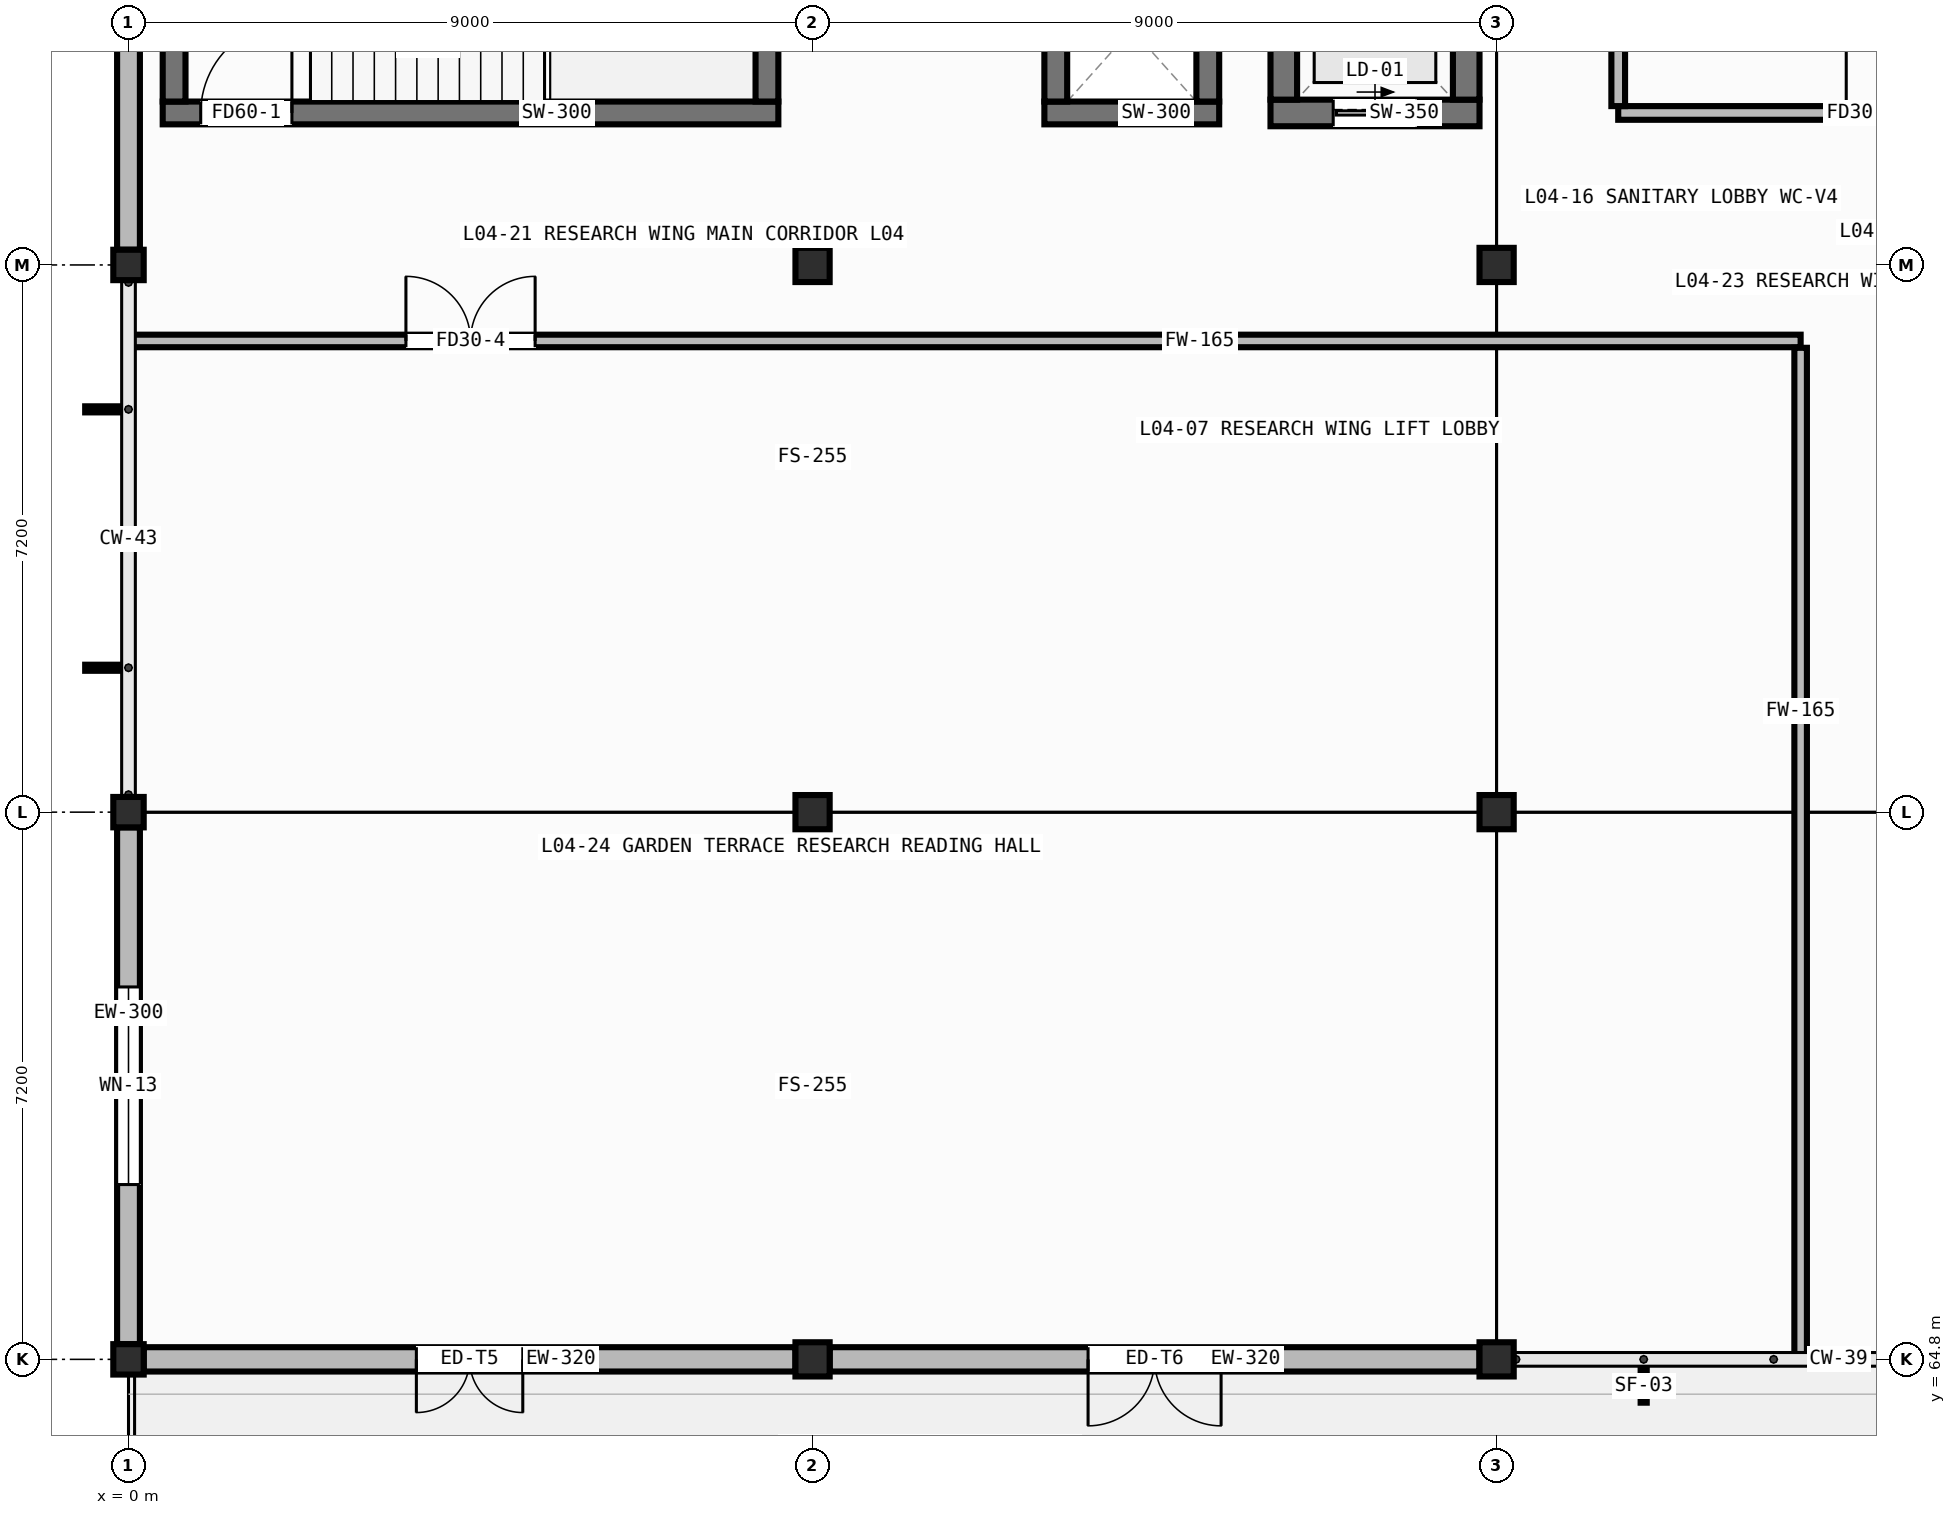
"""IFC4 building model, lengths in metres.
Left out: names, types, materials, properties, quantities, classifications, styles, units other than length and angle.
Written with IfcOpenShell. Run it as: python <this file> out.ifc"""

import sys

from ifc_helpers import new_model, si_unit, direction, frame, frame_2d, origin, origin_2d, place, context, subcontext, project, spatial, rectangle, hollow_rectangle, extrude, element, fill, save


model = new_model("IFC4")
c1 = context("Model", 3, precision=1e-05, world=origin(), true_north=direction((0.0, 1.0)))
c2 = subcontext(c1, "Body", "Model", "MODEL_VIEW")
j1 = project(units=[si_unit("LENGTHUNIT", "METRE"), si_unit("PLANEANGLEUNIT", "RADIAN")], contexts=[c1])
p1 = place(None, origin())
s1 = spatial("IfcSite", under=j1, at=p1, CompositionType="ELEMENT")
p2 = place(p1, origin())
s2 = spatial("IfcBuilding", under=s1, at=p2, CompositionType="ELEMENT")
p3 = place(p2, frame((0.0, 0.0, 12.8)))
s3 = spatial("IfcBuildingStorey", under=s2, at=p3, CompositionType="ELEMENT", Elevation=12.8)
for number, where, z_axis, x_axis in (
    (1, (0.0, 64.8, 0.0), (0.0, 0.0, 1.0), (1.0, 0.0, 0.0)),
    (2, (0.0, 72.0, 0.0), (0.0, 0.0, 1.0), (1.0, 0.0, 0.0)),
    (3, (0.0, 79.2, 0.0), (0.0, 0.0, 1.0), (1.0, 0.0, 0.0)),
):
    element("IfcColumn", number, at=place(p3, frame(where, z_axis=z_axis, x_axis=x_axis)), inside=s3, PredefinedType="COLUMN", context=c2, shape_type="SweptSolid", body=[
        extrude(hollow_rectangle(XDim=0.4, YDim=0.4, WallThickness=0.016, at=origin_2d()), origin(), (0.0, 0.0, 1.0), 4.2),
    ])
for number, where, z_axis, x_axis in (
    (4, (9.0, 64.8, 0.0), (0.0, 0.0, 1.0), (1.0, 0.0, 0.0)),
    (5, (9.0, 72.0, 0.0), (0.0, 0.0, 1.0), (1.0, 0.0, 0.0)),
    (6, (9.0, 79.2, 0.0), (0.0, 0.0, 1.0), (1.0, 0.0, 0.0)),
    (7, (18.0, 64.8, 0.0), (0.0, 0.0, 1.0), (1.0, 0.0, 0.0)),
    (8, (18.0, 72.0, 0.0), (0.0, 0.0, 1.0), (1.0, 0.0, 0.0)),
    (9, (18.0, 79.2, 0.0), (0.0, 0.0, 1.0), (1.0, 0.0, 0.0)),
):
    element("IfcColumn", number, at=place(p3, frame(where, z_axis=z_axis, x_axis=x_axis)), inside=s3, PredefinedType="COLUMN", context=c2, shape_type="SweptSolid", body=[
        extrude(hollow_rectangle(XDim=0.45, YDim=0.45, WallThickness=0.019, at=origin_2d()), origin(), (0.0, 0.0, 1.0), 4.2),
    ])
p4 = place(p3, frame((0.2, 64.8, 0.0), z_axis=(0.0, 0.0, 1.0), x_axis=(1.0, 0.0, 0.0)))
e10 = element("IfcWall", 10, at=p4, inside=s3, PredefinedType="STANDARD", context=c2, shape_type="SweptSolid", body=[
    extrude(rectangle(XDim=8.575, YDim=0.32, at=frame_2d((4.288, 0.0))), origin(), (0.0, 0.0, 1.0), 3.49),
])
p5 = place(p4, frame((3.587, 0.0, 0.0)))
e11 = element("IfcOpeningElement", 11, at=p5, cuts=e10, PredefinedType="OPENING", context=c2, shape_type="SweptSolid", body=[
    extrude(rectangle(XDim=1.4, YDim=2.02, at=frame_2d((0.7, 1.01))), frame((0.0, 0.172, 0.0), z_axis=(0.0, -1.0, 0.0), x_axis=(1.0, 0.0, 0.0)), (0.0, 0.0, 1.0), 0.344),
])
p6 = place(p3, frame((9.225, 64.8, 0.0), z_axis=(0.0, 0.0, 1.0), x_axis=(1.0, 0.0, 0.0)))
e12 = element("IfcWall", 12, at=p6, inside=s3, PredefinedType="STANDARD", context=c2, shape_type="SweptSolid", body=[
    extrude(rectangle(XDim=8.55, YDim=0.32, at=frame_2d((4.275, 0.0))), origin(), (0.0, 0.0, 1.0), 3.49),
])
p7 = place(p6, frame((3.4, 0.0, 0.0)))
e13 = element("IfcOpeningElement", 13, at=p7, cuts=e12, PredefinedType="OPENING", context=c2, shape_type="SweptSolid", body=[
    extrude(rectangle(XDim=1.75, YDim=2.12, at=frame_2d((0.875, 1.06))), frame((0.0, 0.172, 0.0), z_axis=(0.0, -1.0, 0.0), x_axis=(1.0, 0.0, 0.0)), (0.0, 0.0, 1.0), 0.344),
])
p8 = place(p3, frame((0.0, 65.0, 0.0), z_axis=(0.0, 0.0, 1.0), x_axis=(0.0, 1.0, 0.0)))
e14 = element("IfcWall", 14, at=p8, inside=s3, PredefinedType="STANDARD", context=c2, shape_type="SweptSolid", body=[
    extrude(rectangle(XDim=6.8, YDim=0.3, at=frame_2d((3.4, 0.0))), origin(), (0.0, 0.0, 1.0), 3.49),
])
p9 = place(p8, frame((2.1, 0.0, 0.85)))
e15 = element("IfcOpeningElement", 15, at=p9, cuts=e14, PredefinedType="OPENING", context=c2, shape_type="SweptSolid", body=[
    extrude(rectangle(XDim=2.6, YDim=1.6, at=frame_2d((1.3, 0.8))), frame((0.0, 0.162, 0.0), z_axis=(0.0, -1.0, 0.0), x_axis=(1.0, 0.0, 0.0)), (0.0, 0.0, 1.0), 0.324),
])
p10 = place(p3, frame((0.0, 79.4, 0.0), z_axis=(0.0, 0.0, 1.0), x_axis=(0.0, 1.0, 0.0)))
e16 = element("IfcWall", 16, at=p10, inside=s3, PredefinedType="STANDARD", context=c2, shape_type="SweptSolid", body=[
    extrude(rectangle(XDim=6.8, YDim=0.3, at=frame_2d((3.4, 0.0))), origin(), (0.0, 0.0, 1.0), 3.49),
])
p11 = place(p3, frame((0.45, 81.2, 0.0), z_axis=(0.0, 0.0, 1.0), x_axis=(1.0, 0.0, 0.0)))
e17 = element("IfcWall", 17, at=p11, inside=s3, PredefinedType="SHEAR", context=c2, shape_type="SweptSolid", body=[
    extrude(rectangle(XDim=8.1, YDim=0.3, at=frame_2d((4.05, 0.0))), origin(), (0.0, 0.0, 1.0), 3.94),
])
p12 = place(p11, frame((0.5, 0.0, 0.0)))
e18 = element("IfcOpeningElement", 18, at=p12, cuts=e17, PredefinedType="OPENING", context=c2, shape_type="SweptSolid", body=[
    extrude(rectangle(XDim=1.2, YDim=2.1, at=frame_2d((0.6, 1.05))), frame((0.0, 0.162, 0.0), z_axis=(0.0, -1.0, 0.0), x_axis=(1.0, 0.0, 0.0)), (0.0, 0.0, 1.0), 0.324),
])
for number, where, z_axis, x_axis in (
    (19, (0.6, 81.35, 0.0), (0.0, 0.0, 1.0), (0.0, 1.0, 0.0)),
    (20, (8.4, 81.35, 0.0), (0.0, 0.0, 1.0), (0.0, 1.0, 0.0)),
):
    element("IfcWall", number, at=place(p3, frame(where, z_axis=z_axis, x_axis=x_axis)), inside=s3, PredefinedType="SHEAR", context=c2, shape_type="SweptSolid", body=[
        extrude(rectangle(XDim=3.8, YDim=0.3, at=frame_2d((1.9, 0.0))), origin(), (0.0, 0.0, 1.0), 3.94),
    ])
p13 = place(p3, frame((15.025, 81.2, 0.0), z_axis=(0.0, 0.0, 1.0), x_axis=(1.0, 0.0, 0.0)))
e21 = element("IfcWall", 21, at=p13, inside=s3, PredefinedType="SHEAR", context=c2, shape_type="SweptSolid", body=[
    extrude(rectangle(XDim=2.75, YDim=0.35, at=frame_2d((1.375, 0.0))), origin(), (0.0, 0.0, 1.0), 3.94),
])
p14 = place(p13, frame((0.825, 0.0, 0.0)))
e22 = element("IfcOpeningElement", 22, at=p14, cuts=e21, PredefinedType="OPENING", context=c2, shape_type="SweptSolid", body=[
    extrude(rectangle(XDim=1.1, YDim=2.1, at=frame_2d((0.55, 1.05))), frame((0.0, 0.187, 0.0), z_axis=(0.0, -1.0, 0.0), x_axis=(1.0, 0.0, 0.0)), (0.0, 0.0, 1.0), 0.374),
])
for number, where, z_axis, x_axis in (
    (23, (15.2, 81.375, 0.0), (0.0, 0.0, 1.0), (0.0, 1.0, 0.0)),
    (24, (17.6, 81.375, 0.0), (0.0, 0.0, 1.0), (0.0, 1.0, 0.0)),
):
    element("IfcWall", number, at=place(p3, frame(where, z_axis=z_axis, x_axis=x_axis)), inside=s3, PredefinedType="SHEAR", context=c2, shape_type="SweptSolid", body=[
        extrude(rectangle(XDim=2.25, YDim=0.35, at=frame_2d((1.125, 0.0))), origin(), (0.0, 0.0, 1.0), 3.94),
    ])
p15 = place(p3, frame((12.05, 81.2, 0.0), z_axis=(0.0, 0.0, 1.0), x_axis=(1.0, 0.0, 0.0)))
e25 = element("IfcWall", 25, at=p15, inside=s3, PredefinedType="SHEAR", context=c2, shape_type="SweptSolid", body=[
    extrude(rectangle(XDim=2.3, YDim=0.3, at=frame_2d((1.15, 0.0))), origin(), (0.0, 0.0, 1.0), 3.94),
])
for number, where, z_axis, x_axis in (
    (26, (12.2, 81.35, 0.0), (0.0, 0.0, 1.0), (0.0, 1.0, 0.0)),
    (27, (14.2, 81.35, 0.0), (0.0, 0.0, 1.0), (0.0, 1.0, 0.0)),
):
    element("IfcWall", number, at=place(p3, frame(where, z_axis=z_axis, x_axis=x_axis)), inside=s3, PredefinedType="SHEAR", context=c2, shape_type="SweptSolid", body=[
        extrude(rectangle(XDim=1.9, YDim=0.3, at=frame_2d((0.95, 0.0))), origin(), (0.0, 0.0, 1.0), 3.94),
    ])
p16 = place(p3, frame((19.6, 81.2, 0.0), z_axis=(0.0, 0.0, 1.0), x_axis=(1.0, 0.0, 0.0)))
e28 = element("IfcWall", 28, at=p16, inside=s3, PredefinedType="PARTITIONING", context=c2, shape_type="SweptSolid", body=[
    extrude(rectangle(XDim=7.0, YDim=0.18, at=frame_2d((3.5, 0.0))), origin(), (0.0, 0.0, 1.0), 3.94),
])
p17 = place(p16, frame((3.0, 0.0, 0.0)))
e29 = element("IfcOpeningElement", 29, at=p17, cuts=e28, PredefinedType="OPENING", context=c2, shape_type="SweptSolid", body=[
    extrude(rectangle(XDim=1.0, YDim=2.08, at=frame_2d((0.5, 1.04))), frame((0.0, 0.102, 0.0), z_axis=(0.0, -1.0, 0.0), x_axis=(1.0, 0.0, 0.0)), (0.0, 0.0, 1.0), 0.204),
])
p18 = place(p3, frame((19.6, 81.29, 0.0), z_axis=(0.0, 0.0, 1.0), x_axis=(0.0, 1.0, 0.0)))
e30 = element("IfcWall", 30, at=p18, inside=s3, PredefinedType="PARTITIONING", context=c2, shape_type="SweptSolid", body=[
    extrude(rectangle(XDim=2.22, YDim=0.18, at=frame_2d((1.11, 0.0))), origin(), (0.0, 0.0, 1.0), 3.94),
])
p19 = place(p3, frame((0.035, 78.2, 0.0), z_axis=(0.0, 0.0, 1.0), x_axis=(1.0, 0.0, 0.0)))
e31 = element("IfcWall", 31, at=p19, inside=s3, PredefinedType="PARTITIONING", context=c2, shape_type="SweptSolid", body=[
    extrude(rectangle(XDim=21.965, YDim=0.165, at=frame_2d((10.982, 0.0))), origin(), (0.0, 0.0, 1.0), 3.94),
])
p20 = place(p19, frame((3.615, 0.0, 0.0)))
e32 = element("IfcOpeningElement", 32, at=p20, cuts=e31, PredefinedType="OPENING", context=c2, shape_type="SweptSolid", body=[
    extrude(rectangle(XDim=1.7, YDim=2.12, at=frame_2d((0.85, 1.06))), frame((0.0, 0.094, 0.0), z_axis=(0.0, -1.0, 0.0), x_axis=(1.0, 0.0, 0.0)), (0.0, 0.0, 1.0), 0.189),
])
p21 = place(p3, frame((22.0, 64.835, 0.0), z_axis=(0.0, 0.0, 1.0), x_axis=(0.0, 1.0, 0.0)))
e33 = element("IfcWall", 33, at=p21, inside=s3, PredefinedType="PARTITIONING", context=c2, shape_type="SweptSolid", body=[
    extrude(rectangle(XDim=13.275, YDim=0.165, at=frame_2d((6.638, 0.0))), origin(), (0.0, 0.0, 1.0), 3.94),
])
p22 = place(p5, frame((1.4, 0.0, 0.0), z_axis=(0.0, 0.0, 1.0), x_axis=(-1.0, 0.0, 0.0)))
e34 = element("IfcDoor", 34, at=p22, inside=s3, OperationType="DOUBLE_DOOR_SINGLE_SWING", PredefinedType="DOOR", context=c2, shape_type="SweptSolid", body=[
    extrude(rectangle(XDim=1.4, YDim=2.02, at=frame_2d((0.7, 1.01))), frame((0.0, 0.025, 0.0), z_axis=(0.0, -1.0, 0.0), x_axis=(1.0, 0.0, 0.0)), (0.0, 0.0, 1.0), 0.05),
])
fill(e11, e34)
p23 = place(p7, frame((1.75, 0.0, 0.0), z_axis=(0.0, 0.0, 1.0), x_axis=(-1.0, 0.0, 0.0)))
e35 = element("IfcDoor", 35, at=p23, inside=s3, OperationType="DOUBLE_DOOR_SINGLE_SWING", PredefinedType="DOOR", context=c2, shape_type="SweptSolid", body=[
    extrude(rectangle(XDim=1.75, YDim=2.12, at=frame_2d((0.875, 1.06))), frame((0.0, 0.025, 0.0), z_axis=(0.0, -1.0, 0.0), x_axis=(1.0, 0.0, 0.0)), (0.0, 0.0, 1.0), 0.05),
])
fill(e13, e35)
p24 = place(p9, origin())
e36 = element("IfcWindow", 36, at=p24, inside=s3, PartitioningType="DOUBLE_PANEL_VERTICAL", PredefinedType="WINDOW", context=c2, shape_type="SweptSolid", body=[
    extrude(rectangle(XDim=2.6, YDim=1.6, at=frame_2d((1.3, 0.8))), frame((0.0, 0.03, 0.0), z_axis=(0.0, -1.0, 0.0), x_axis=(1.0, 0.0, 0.0)), (0.0, 0.0, 1.0), 0.06),
])
fill(e15, e36)
p25 = place(p12, origin())
e37 = element("IfcDoor", 37, at=p25, inside=s3, OperationType="SINGLE_SWING_RIGHT", PredefinedType="DOOR", context=c2, shape_type="SweptSolid", body=[
    extrude(rectangle(XDim=1.2, YDim=2.1, at=frame_2d((0.6, 1.05))), frame((0.0, 0.025, 0.0), z_axis=(0.0, -1.0, 0.0), x_axis=(1.0, 0.0, 0.0)), (0.0, 0.0, 1.0), 0.05),
])
fill(e18, e37)
p26 = place(p14, origin())
e38 = element("IfcDoor", 38, at=p26, inside=s3, OperationType="SLIDING_TO_LEFT", PredefinedType="DOOR", context=c2, shape_type="SweptSolid", body=[
    extrude(rectangle(XDim=1.1, YDim=2.1, at=frame_2d((0.55, 1.05))), frame((0.0, 0.025, 0.0), z_axis=(0.0, -1.0, 0.0), x_axis=(1.0, 0.0, 0.0)), (0.0, 0.0, 1.0), 0.05),
])
fill(e22, e38)
p27 = place(p17, origin())
e39 = element("IfcDoor", 39, at=p27, inside=s3, OperationType="SINGLE_SWING_LEFT", PredefinedType="DOOR", context=c2, shape_type="SweptSolid", body=[
    extrude(rectangle(XDim=1.0, YDim=2.08, at=frame_2d((0.5, 1.04))), frame((0.0, 0.025, 0.0), z_axis=(0.0, -1.0, 0.0), x_axis=(1.0, 0.0, 0.0)), (0.0, 0.0, 1.0), 0.05),
])
fill(e29, e39)
p28 = place(p20, origin())
e40 = element("IfcDoor", 40, at=p28, inside=s3, OperationType="DOUBLE_DOOR_SINGLE_SWING", PredefinedType="DOOR", context=c2, shape_type="SweptSolid", body=[
    extrude(rectangle(XDim=1.7, YDim=2.12, at=frame_2d((0.85, 1.06))), frame((0.0, 0.025, 0.0), z_axis=(0.0, -1.0, 0.0), x_axis=(1.0, 0.0, 0.0)), (0.0, 0.0, 1.0), 0.05),
])
fill(e32, e40)
save(model, sys.argv[1])
